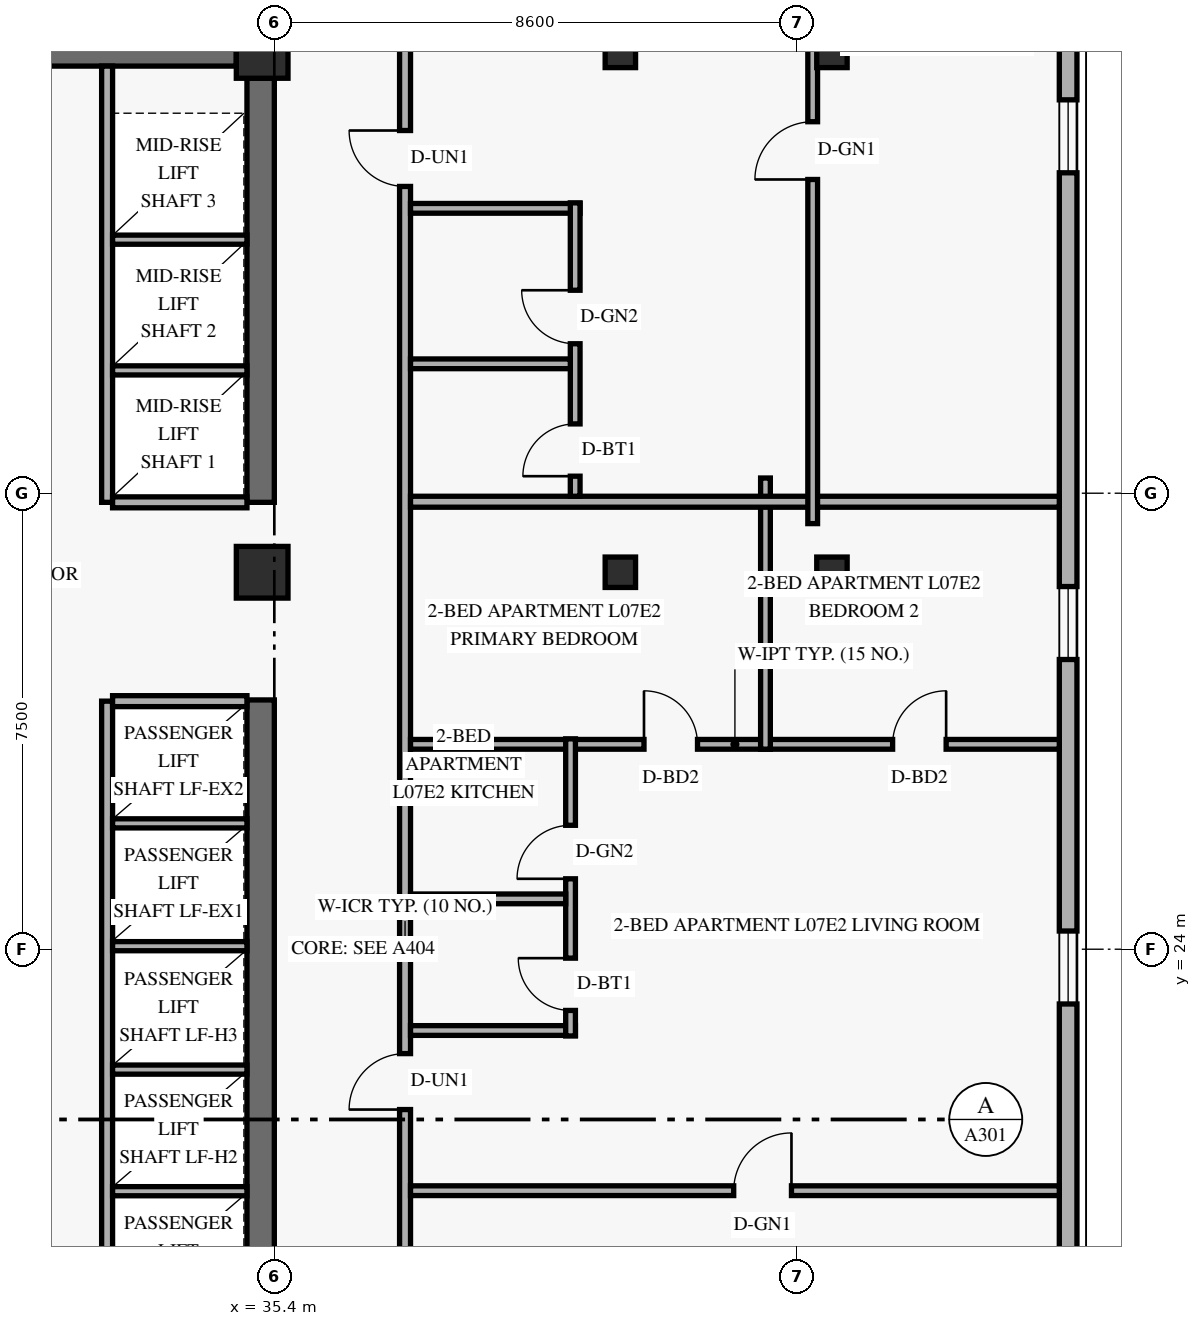
"""IFC4 building model, lengths in metres.
Left out: names, types, materials, properties, quantities, classifications, styles, units other than length and angle.
Written with IfcOpenShell. Run it as: python <this file> out.ifc"""

import sys

from ifc_helpers import new_model, si_unit, direction, frame, frame_2d, origin, origin_2d, place, context, subcontext, project, spatial, rectangle, hollow_rectangle, extrude, element, fill, save


model = new_model("IFC4")
c1 = context("Model", 3, precision=1e-05, world=origin(), true_north=direction((0.0, 1.0)))
c2 = subcontext(c1, "Body", "Model", "MODEL_VIEW")
j1 = project(units=[si_unit("LENGTHUNIT", "METRE"), si_unit("PLANEANGLEUNIT", "RADIAN")], contexts=[c1])
p1 = place(None, origin())
s1 = spatial("IfcSite", under=j1, at=p1, CompositionType="ELEMENT")
p2 = place(p1, origin())
s2 = spatial("IfcBuilding", under=s1, at=p2, CompositionType="ELEMENT")
p3 = place(p2, frame((0.0, 0.0, 31.2)))
s3 = spatial("IfcBuildingStorey", under=s2, at=p3, CompositionType="ELEMENT", Elevation=31.2)
p4 = place(p3, frame((35.175, 17.975, 0.0), z_axis=(0.0, 0.0, 1.0), x_axis=(0.0, 1.0, 0.0)))
e1 = element("IfcWall", 1, at=p4, inside=s3, PredefinedType="SHEAR", context=c2, shape_type="SweptSolid", body=[
    extrude(rectangle(XDim=10.125, YDim=0.45, at=frame_2d((5.062, 0.0))), origin(), (0.0, 0.0, 1.0), 2.667),
])
p5 = place(p3, frame((35.175, 31.35, 0.0), z_axis=(0.0, 0.0, 1.0), x_axis=(0.0, 1.0, 0.0)))
e2 = element("IfcWall", 2, at=p5, inside=s3, PredefinedType="SHEAR", context=c2, shape_type="SweptSolid", body=[
    extrude(rectangle(XDim=6.975, YDim=0.45, at=frame_2d((3.487, 0.0))), origin(), (0.0, 0.0, 1.0), 2.667),
])
p6 = place(p3, frame((24.625, 38.75, 0.0), z_axis=(0.0, 0.0, 1.0), x_axis=(1.0, 0.0, 0.0)))
e3 = element("IfcWall", 3, at=p6, inside=s3, PredefinedType="SHEAR", context=c2, shape_type="SweptSolid", body=[
    extrude(rectangle(XDim=10.15, YDim=0.45, at=frame_2d((5.075, 0.0))), origin(), (0.0, 0.0, 1.0), 3.36),
])
for number, where, z_axis, x_axis in (
    (4, (35.2, 30.2, 0.0), (0.0, 0.0, 1.0), (1.0, 0.0, 0.0)),
    (5, (35.2, 38.75, 0.0), (0.0, 0.0, 1.0), (1.0, 0.0, 0.0)),
):
    element("IfcColumn", number, at=place(p3, frame(where, z_axis=z_axis, x_axis=x_axis)), inside=s3, PredefinedType="COLUMN", context=c2, shape_type="SweptSolid", body=[
        extrude(rectangle(XDim=0.85, YDim=0.85, at=origin_2d()), origin(), (0.0, 0.0, 1.0), 3.6),
    ])
for number, where, z_axis, x_axis in (
    (6, (41.028, 30.2, 0.0), (0.035, 0.0, 0.999), (0.0, 1.0, 0.0)),
    (7, (41.028, 38.75, 0.0), (0.035, 0.0, 0.999), (0.0, 1.0, 0.0)),
):
    element("IfcColumn", number, at=place(p3, frame(where, z_axis=z_axis, x_axis=x_axis)), inside=s3, PredefinedType="COLUMN", context=c2, shape_type="SweptSolid", body=[
        extrude(hollow_rectangle(XDim=0.5, YDim=0.5, WallThickness=0.022, at=origin_2d()), origin(), (0.0, 0.0, 1.0), 3.602),
    ])
for number, where, z_axis, x_axis in (
    (8, (44.466, 30.2, 0.0), (0.058, 0.0, 0.998), (0.0, 1.0, 0.0)),
    (9, (44.466, 38.75, 0.0), (0.058, 0.0, 0.998), (0.0, 1.0, 0.0)),
):
    element("IfcColumn", number, at=place(p3, frame(where, z_axis=z_axis, x_axis=x_axis)), inside=s3, PredefinedType="COLUMN", context=c2, shape_type="SweptSolid", body=[
        extrude(hollow_rectangle(XDim=0.5, YDim=0.5, WallThickness=0.022, at=origin_2d()), origin(), (0.0, 0.0, 1.0), 3.606),
    ])
p7 = place(p3, frame((48.455, 4.62, 0.0), z_axis=(0.0, 0.0, 1.0), x_axis=(0.0, 1.0, 0.0)))
e10 = element("IfcWall", 10, at=p7, inside=s3, PredefinedType="SOLIDWALL", context=c2, shape_type="SweptSolid", body=[
    extrude(rectangle(XDim=38.76, YDim=0.29, at=frame_2d((19.38, 0.0))), origin(), (0.0, 0.0, 1.0), 3.36),
])
p8 = place(p7, frame((4.95, 0.0, 0.85)))
e11 = element("IfcOpeningElement", 11, at=p8, cuts=e10, PredefinedType="OPENING", context=c2, shape_type="SweptSolid", body=[
    extrude(rectangle(XDim=1.2, YDim=1.5, at=frame_2d((0.6, 0.75))), frame((0.0, 0.155, 0.0), z_axis=(0.0, -1.0, 0.0), x_axis=(1.0, 0.0, 0.0)), (0.0, 0.0, 1.0), 0.31),
])
p9 = place(p7, frame((12.654, 0.0, 0.85)))
e12 = element("IfcOpeningElement", 12, at=p9, cuts=e10, PredefinedType="OPENING", context=c2, shape_type="SweptSolid", body=[
    extrude(rectangle(XDim=1.2, YDim=1.5, at=frame_2d((0.6, 0.75))), frame((0.0, 0.155, 0.0), z_axis=(0.0, -1.0, 0.0), x_axis=(1.0, 0.0, 0.0)), (0.0, 0.0, 1.0), 0.31),
])
p10 = place(p7, frame((18.479, 0.0, 0.85)))
e13 = element("IfcOpeningElement", 13, at=p10, cuts=e10, PredefinedType="OPENING", context=c2, shape_type="SweptSolid", body=[
    extrude(rectangle(XDim=1.2, YDim=1.5, at=frame_2d((0.6, 0.75))), frame((0.0, 0.155, 0.0), z_axis=(0.0, -1.0, 0.0), x_axis=(1.0, 0.0, 0.0)), (0.0, 0.0, 1.0), 0.31),
])
p11 = place(p7, frame((24.145, 0.0, 0.85)))
e14 = element("IfcOpeningElement", 14, at=p11, cuts=e10, PredefinedType="OPENING", context=c2, shape_type="SweptSolid", body=[
    extrude(rectangle(XDim=1.2, YDim=1.5, at=frame_2d((0.6, 0.75))), frame((0.0, 0.155, 0.0), z_axis=(0.0, -1.0, 0.0), x_axis=(1.0, 0.0, 0.0)), (0.0, 0.0, 1.0), 0.31),
])
p12 = place(p7, frame((32.15, 0.0, 0.85)))
e15 = element("IfcOpeningElement", 15, at=p12, cuts=e10, PredefinedType="OPENING", context=c2, shape_type="SweptSolid", body=[
    extrude(rectangle(XDim=1.2, YDim=1.5, at=frame_2d((0.6, 0.75))), frame((0.0, 0.155, 0.0), z_axis=(0.0, -1.0, 0.0), x_axis=(1.0, 0.0, 0.0)), (0.0, 0.0, 1.0), 0.31),
])
p13 = place(p3, frame((32.65, 18.02, 0.0), z_axis=(0.0, 0.0, 1.0), x_axis=(0.0, 1.0, 0.0)))
e16 = element("IfcWall", 16, at=p13, inside=s3, PredefinedType="STANDARD", context=c2, shape_type="SweptSolid", body=[
    extrude(rectangle(XDim=10.06, YDim=0.18, at=frame_2d((5.03, 0.0))), origin(), (0.0, 0.0, 1.0), 3.36),
])
p14 = place(p3, frame((32.74, 28.08, 0.0), z_axis=(0.0, 0.0, 1.0), x_axis=(1.0, 0.0, 0.0)))
e17 = element("IfcWall", 17, at=p14, inside=s3, PredefinedType="STANDARD", context=c2, shape_type="SweptSolid", body=[
    extrude(rectangle(XDim=2.21, YDim=0.18, at=frame_2d((1.105, 0.0))), origin(), (0.0, 0.0, 1.0), 3.36),
])
for number, where, z_axis, x_axis in (
    (18, (32.74, 20.02, 0.0), (0.0, 0.0, 1.0), (1.0, 0.0, 0.0)),
    (19, (32.74, 22.02, 0.0), (0.0, 0.0, 1.0), (1.0, 0.0, 0.0)),
    (20, (32.74, 24.05, 0.0), (0.0, 0.0, 1.0), (1.0, 0.0, 0.0)),
    (21, (32.74, 26.07, 0.0), (0.0, 0.0, 1.0), (1.0, 0.0, 0.0)),
):
    element("IfcWall", number, at=place(p3, frame(where, z_axis=z_axis, x_axis=x_axis)), inside=s3, PredefinedType="STANDARD", context=c2, shape_type="SweptSolid", body=[
        extrude(rectangle(XDim=2.21, YDim=0.15, at=frame_2d((1.105, 0.0))), origin(), (0.0, 0.0, 1.0), 3.36),
    ])
p15 = place(p3, frame((32.65, 31.35, 0.0), z_axis=(0.0, 0.0, 1.0), x_axis=(0.0, 1.0, 0.0)))
e22 = element("IfcWall", 22, at=p15, inside=s3, PredefinedType="STANDARD", context=c2, shape_type="SweptSolid", body=[
    extrude(rectangle(XDim=7.175, YDim=0.18, at=frame_2d((3.587, 0.0))), origin(), (0.0, 0.0, 1.0), 3.36),
])
p16 = place(p3, frame((32.74, 31.35, 0.0), z_axis=(0.0, 0.0, 1.0), x_axis=(1.0, 0.0, 0.0)))
e23 = element("IfcWall", 23, at=p16, inside=s3, PredefinedType="STANDARD", context=c2, shape_type="SweptSolid", body=[
    extrude(rectangle(XDim=2.21, YDim=0.18, at=frame_2d((1.105, 0.0))), origin(), (0.0, 0.0, 1.0), 3.36),
])
for number, where, z_axis, x_axis in (
    (24, (32.74, 33.52, 0.0), (0.0, 0.0, 1.0), (1.0, 0.0, 0.0)),
    (25, (32.74, 35.67, 0.0), (0.0, 0.0, 1.0), (1.0, 0.0, 0.0)),
):
    element("IfcWall", number, at=place(p3, frame(where, z_axis=z_axis, x_axis=x_axis)), inside=s3, PredefinedType="STANDARD", context=c2, shape_type="SweptSolid", body=[
        extrude(rectangle(XDim=2.21, YDim=0.15, at=frame_2d((1.105, 0.0))), origin(), (0.0, 0.0, 1.0), 3.36),
    ])
p17 = place(p3, frame((37.55, 1.29, 0.0), z_axis=(0.0, 0.0, 1.0), x_axis=(0.0, 1.0, 0.0)))
e26 = element("IfcWall", 26, at=p17, inside=s3, PredefinedType="STANDARD", context=c2, shape_type="SweptSolid", body=[
    extrude(rectangle(XDim=45.42, YDim=0.18, at=frame_2d((22.71, 0.0))), origin(), (0.0, 0.0, 1.0), 2.649),
])
p18 = place(p17, frame((8.49, 0.0, 0.0)))
e27 = element("IfcOpeningElement", 27, at=p18, cuts=e26, PredefinedType="OPENING", context=c2, shape_type="SweptSolid", body=[
    extrude(rectangle(XDim=0.92, YDim=2.15, at=frame_2d((0.46, 1.075))), frame((0.0, 0.1, 0.0), z_axis=(0.0, -1.0, 0.0), x_axis=(1.0, 0.0, 0.0)), (0.0, 0.0, 1.0), 0.2),
])
p19 = place(p17, frame((20.073, 0.0, 0.0)))
e28 = element("IfcOpeningElement", 28, at=p19, cuts=e26, PredefinedType="OPENING", context=c2, shape_type="SweptSolid", body=[
    extrude(rectangle(XDim=0.92, YDim=2.15, at=frame_2d((0.46, 1.075))), frame((0.0, 0.1, 0.0), z_axis=(0.0, -1.0, 0.0), x_axis=(1.0, 0.0, 0.0)), (0.0, 0.0, 1.0), 0.2),
])
p20 = place(p17, frame((35.256, 0.0, 0.0)))
e29 = element("IfcOpeningElement", 29, at=p20, cuts=e26, PredefinedType="OPENING", context=c2, shape_type="SweptSolid", body=[
    extrude(rectangle(XDim=0.92, YDim=2.15, at=frame_2d((0.46, 1.075))), frame((0.0, 0.1, 0.0), z_axis=(0.0, -1.0, 0.0), x_axis=(1.0, 0.0, 0.0)), (0.0, 0.0, 1.0), 0.2),
])
p21 = place(p3, frame((35.42, 38.75, 0.0), z_axis=(0.0, 0.0, 1.0), x_axis=(0.0, 1.0, 0.0)))
e30 = element("IfcWall", 30, at=p21, inside=s3, PredefinedType="STANDARD", context=c2, shape_type="SweptSolid", body=[
    extrude(rectangle(XDim=0.51, YDim=0.18, at=frame_2d((0.255, 0.0))), origin(), (0.0, 0.0, 1.0), 3.36),
])
p22 = place(p3, frame((37.64, 27.37, 0.0), z_axis=(0.0, 0.0, 1.0), x_axis=(1.0, 0.0, 0.0)))
e31 = element("IfcWall", 31, at=p22, inside=s3, PredefinedType="PARTITIONING", context=c2, shape_type="SweptSolid", body=[
    extrude(rectangle(XDim=10.67, YDim=0.16, at=frame_2d((5.335, 0.0))), origin(), (0.0, 0.0, 1.0), 2.649),
])
p23 = place(p22, frame((3.84, 0.0, 0.0)))
e32 = element("IfcOpeningElement", 32, at=p23, cuts=e31, PredefinedType="OPENING", context=c2, shape_type="SweptSolid", body=[
    extrude(rectangle(XDim=0.88, YDim=2.14, at=frame_2d((0.44, 1.07))), frame((0.0, 0.09, 0.0), z_axis=(0.0, -1.0, 0.0), x_axis=(1.0, 0.0, 0.0)), (0.0, 0.0, 1.0), 0.18),
])
p24 = place(p22, frame((7.929, 0.0, 0.0)))
e33 = element("IfcOpeningElement", 33, at=p24, cuts=e31, PredefinedType="OPENING", context=c2, shape_type="SweptSolid", body=[
    extrude(rectangle(XDim=0.88, YDim=2.14, at=frame_2d((0.44, 1.07))), frame((0.0, 0.09, 0.0), z_axis=(0.0, -1.0, 0.0), x_axis=(1.0, 0.0, 0.0)), (0.0, 0.0, 1.0), 0.18),
])
p25 = place(p3, frame((37.64, 22.663, 0.0), z_axis=(0.0, 0.0, 1.0), x_axis=(1.0, 0.0, 0.0)))
e34 = element("IfcWall", 34, at=p25, inside=s3, PredefinedType="PLUMBINGWALL", context=c2, shape_type="SweptSolid", body=[
    extrude(rectangle(XDim=2.712, YDim=0.16, at=frame_2d((1.356, 0.0))), origin(), (0.0, 0.0, 1.0), 3.36),
])
p26 = place(p3, frame((40.272, 22.573, 0.0), z_axis=(0.0, 0.0, 1.0), x_axis=(0.0, 1.0, 0.0)))
e35 = element("IfcWall", 35, at=p26, inside=s3, PredefinedType="PLUMBINGWALL", context=c2, shape_type="SweptSolid", body=[
    extrude(rectangle(XDim=4.887, YDim=0.16, at=frame_2d((2.443, 0.0))), origin(), (0.0, 0.0, 1.0), 3.36),
])
p27 = place(p26, frame((0.42, 0.0, 0.0)))
e36 = element("IfcOpeningElement", 36, at=p27, cuts=e35, PredefinedType="OPENING", context=c2, shape_type="SweptSolid", body=[
    extrude(rectangle(XDim=0.86, YDim=2.12, at=frame_2d((0.43, 1.06))), frame((0.0, 0.09, 0.0), z_axis=(0.0, -1.0, 0.0), x_axis=(1.0, 0.0, 0.0)), (0.0, 0.0, 1.0), 0.18),
])
p28 = place(p26, frame((2.585, 0.0, 0.0)))
e37 = element("IfcOpeningElement", 37, at=p28, cuts=e35, PredefinedType="OPENING", context=c2, shape_type="SweptSolid", body=[
    extrude(rectangle(XDim=0.88, YDim=2.12, at=frame_2d((0.44, 1.06))), frame((0.0, 0.09, 0.0), z_axis=(0.0, -1.0, 0.0), x_axis=(1.0, 0.0, 0.0)), (0.0, 0.0, 1.0), 0.18),
])
p29 = place(p3, frame((37.64, 24.828, 0.0), z_axis=(0.0, 0.0, 1.0), x_axis=(1.0, 0.0, 0.0)))
e38 = element("IfcWall", 38, at=p29, inside=s3, PredefinedType="PLUMBINGWALL", context=c2, shape_type="SweptSolid", body=[
    extrude(rectangle(XDim=2.552, YDim=0.16, at=frame_2d((1.276, 0.0))), origin(), (0.0, 0.0, 1.0), 3.36),
])
p30 = place(p3, frame((37.64, 20.029, 0.0), z_axis=(0.0, 0.0, 1.0), x_axis=(1.0, 0.0, 0.0)))
e39 = element("IfcWall", 39, at=p30, inside=s3, PredefinedType="PARTITIONING", context=c2, shape_type="SweptSolid", body=[
    extrude(rectangle(XDim=10.67, YDim=0.16, at=frame_2d((5.335, 0.0))), origin(), (0.0, 0.0, 1.0), 2.649),
])
p31 = place(p30, frame((5.315, 0.0, 0.0)))
e40 = element("IfcOpeningElement", 40, at=p31, cuts=e39, PredefinedType="OPENING", context=c2, shape_type="SweptSolid", body=[
    extrude(rectangle(XDim=0.95, YDim=2.15, at=frame_2d((0.475, 1.075))), frame((0.0, 0.09, 0.0), z_axis=(0.0, -1.0, 0.0), x_axis=(1.0, 0.0, 0.0)), (0.0, 0.0, 1.0), 0.18),
])
p32 = place(p3, frame((43.477, 27.29, 0.0), z_axis=(0.0, 0.0, 1.0), x_axis=(0.0, 1.0, 0.0)))
e41 = element("IfcWall", 41, at=p32, inside=s3, PredefinedType="PARTITIONING", context=c2, shape_type="SweptSolid", body=[
    extrude(rectangle(XDim=4.46, YDim=0.16, at=frame_2d((2.23, 0.0))), origin(), (0.0, 0.0, 1.0), 2.649),
])
p33 = place(p3, frame((37.64, 31.36, 0.0), z_axis=(0.0, 0.0, 1.0), x_axis=(1.0, 0.0, 0.0)))
e42 = element("IfcWall", 42, at=p33, inside=s3, PredefinedType="PARTITIONING", context=c2, shape_type="SweptSolid", body=[
    extrude(rectangle(XDim=10.67, YDim=0.18, at=frame_2d((5.335, 0.0))), origin(), (0.0, 0.0, 1.0), 2.649),
])
p34 = place(p3, frame((37.64, 36.186, 0.0), z_axis=(0.0, 0.0, 1.0), x_axis=(1.0, 0.0, 0.0)))
e43 = element("IfcWall", 43, at=p34, inside=s3, PredefinedType="PLUMBINGWALL", context=c2, shape_type="SweptSolid", body=[
    extrude(rectangle(XDim=2.788, YDim=0.16, at=frame_2d((1.394, 0.0))), origin(), (0.0, 0.0, 1.0), 3.36),
])
p35 = place(p3, frame((40.348, 31.45, 0.0), z_axis=(0.0, 0.0, 1.0), x_axis=(0.0, 1.0, 0.0)))
e44 = element("IfcWall", 44, at=p35, inside=s3, PredefinedType="PLUMBINGWALL", context=c2, shape_type="SweptSolid", body=[
    extrude(rectangle(XDim=4.825, YDim=0.16, at=frame_2d((2.413, 0.0))), origin(), (0.0, 0.0, 1.0), 2.932),
])
p36 = place(p35, frame((0.33, 0.0, 0.0)))
e45 = element("IfcOpeningElement", 45, at=p36, cuts=e44, PredefinedType="OPENING", context=c2, shape_type="SweptSolid", body=[
    extrude(rectangle(XDim=0.86, YDim=2.12, at=frame_2d((0.43, 1.06))), frame((0.0, 0.09, 0.0), z_axis=(0.0, -1.0, 0.0), x_axis=(1.0, 0.0, 0.0)), (0.0, 0.0, 1.0), 0.18),
])
p37 = place(p35, frame((2.508, 0.0, 0.0)))
e46 = element("IfcOpeningElement", 46, at=p37, cuts=e44, PredefinedType="OPENING", context=c2, shape_type="SweptSolid", body=[
    extrude(rectangle(XDim=0.88, YDim=2.12, at=frame_2d((0.44, 1.06))), frame((0.0, 0.09, 0.0), z_axis=(0.0, -1.0, 0.0), x_axis=(1.0, 0.0, 0.0)), (0.0, 0.0, 1.0), 0.18),
])
p38 = place(p3, frame((37.64, 33.628, 0.0), z_axis=(0.0, 0.0, 1.0), x_axis=(1.0, 0.0, 0.0)))
e47 = element("IfcWall", 47, at=p38, inside=s3, PredefinedType="PLUMBINGWALL", context=c2, shape_type="SweptSolid", body=[
    extrude(rectangle(XDim=2.628, YDim=0.16, at=frame_2d((1.314, 0.0))), origin(), (0.0, 0.0, 1.0), 3.36),
])
p39 = place(p3, frame((44.254, 31.0, 0.0), z_axis=(0.0, 0.0, 1.0), x_axis=(0.0, 1.0, 0.0)))
e48 = element("IfcWall", 48, at=p39, inside=s3, PredefinedType="PARTITIONING", context=c2, shape_type="SweptSolid", body=[
    extrude(rectangle(XDim=12.84, YDim=0.16, at=frame_2d((6.42, 0.0))), origin(), (0.0, 0.0, 1.0), 2.649),
])
p40 = place(p39, frame((5.66, 0.0, 0.0)))
e49 = element("IfcOpeningElement", 49, at=p40, cuts=e48, PredefinedType="OPENING", context=c2, shape_type="SweptSolid", body=[
    extrude(rectangle(XDim=0.95, YDim=2.15, at=frame_2d((0.475, 1.075))), frame((0.0, 0.09, 0.0), z_axis=(0.0, -1.0, 0.0), x_axis=(1.0, 0.0, 0.0)), (0.0, 0.0, 1.0), 0.18),
])
p41 = place(p10, origin())
e50 = element("IfcWindow", 50, at=p41, inside=s3, PartitioningType="SINGLE_PANEL", PredefinedType="WINDOW", context=c2, shape_type="SweptSolid", body=[
    extrude(rectangle(XDim=1.2, YDim=1.5, at=frame_2d((0.6, 0.75))), frame((0.0, 0.03, 0.0), z_axis=(0.0, -1.0, 0.0), x_axis=(1.0, 0.0, 0.0)), (0.0, 0.0, 1.0), 0.06),
])
fill(e13, e50)
p42 = place(p11, origin())
e51 = element("IfcWindow", 51, at=p42, inside=s3, PartitioningType="SINGLE_PANEL", PredefinedType="WINDOW", context=c2, shape_type="SweptSolid", body=[
    extrude(rectangle(XDim=1.2, YDim=1.5, at=frame_2d((0.6, 0.75))), frame((0.0, 0.03, 0.0), z_axis=(0.0, -1.0, 0.0), x_axis=(1.0, 0.0, 0.0)), (0.0, 0.0, 1.0), 0.06),
])
fill(e14, e51)
p43 = place(p12, origin())
e52 = element("IfcWindow", 52, at=p43, inside=s3, PartitioningType="SINGLE_PANEL", PredefinedType="WINDOW", context=c2, shape_type="SweptSolid", body=[
    extrude(rectangle(XDim=1.2, YDim=1.5, at=frame_2d((0.6, 0.75))), frame((0.0, 0.03, 0.0), z_axis=(0.0, -1.0, 0.0), x_axis=(1.0, 0.0, 0.0)), (0.0, 0.0, 1.0), 0.06),
])
fill(e15, e52)
p44 = place(p31, origin())
e53 = element("IfcDoor", 53, at=p44, inside=s3, OperationType="SINGLE_SWING_RIGHT", PredefinedType="DOOR", context=c2, shape_type="SweptSolid", body=[
    extrude(rectangle(XDim=0.95, YDim=2.15, at=frame_2d((0.475, 1.075))), frame((0.0, 0.025, 0.0), z_axis=(0.0, -1.0, 0.0), x_axis=(1.0, 0.0, 0.0)), (0.0, 0.0, 1.0), 0.05),
])
fill(e40, e53)
p45 = place(p19, origin())
e54 = element("IfcDoor", 54, at=p45, inside=s3, OperationType="SINGLE_SWING_LEFT", PredefinedType="DOOR", context=c2, shape_type="SweptSolid", body=[
    extrude(rectangle(XDim=0.92, YDim=2.15, at=frame_2d((0.46, 1.075))), frame((0.0, 0.025, 0.0), z_axis=(0.0, -1.0, 0.0), x_axis=(1.0, 0.0, 0.0)), (0.0, 0.0, 1.0), 0.05),
])
fill(e28, e54)
p46 = place(p27, origin())
e55 = element("IfcDoor", 55, at=p46, inside=s3, OperationType="SINGLE_SWING_RIGHT", PredefinedType="DOOR", context=c2, shape_type="SweptSolid", body=[
    extrude(rectangle(XDim=0.86, YDim=2.12, at=frame_2d((0.43, 1.06))), frame((0.0, 0.025, 0.0), z_axis=(0.0, -1.0, 0.0), x_axis=(1.0, 0.0, 0.0)), (0.0, 0.0, 1.0), 0.05),
])
fill(e36, e55)
p47 = place(p28, origin())
e56 = element("IfcDoor", 56, at=p47, inside=s3, OperationType="SINGLE_SWING_LEFT", PredefinedType="DOOR", context=c2, shape_type="SweptSolid", body=[
    extrude(rectangle(XDim=0.88, YDim=2.12, at=frame_2d((0.44, 1.06))), frame((0.0, 0.025, 0.0), z_axis=(0.0, -1.0, 0.0), x_axis=(1.0, 0.0, 0.0)), (0.0, 0.0, 1.0), 0.05),
])
fill(e37, e56)
p48 = place(p23, origin())
e57 = element("IfcDoor", 57, at=p48, inside=s3, OperationType="SINGLE_SWING_LEFT", PredefinedType="DOOR", context=c2, shape_type="SweptSolid", body=[
    extrude(rectangle(XDim=0.88, YDim=2.14, at=frame_2d((0.44, 1.07))), frame((0.0, 0.025, 0.0), z_axis=(0.0, -1.0, 0.0), x_axis=(1.0, 0.0, 0.0)), (0.0, 0.0, 1.0), 0.05),
])
fill(e32, e57)
p49 = place(p24, origin())
e58 = element("IfcDoor", 58, at=p49, inside=s3, OperationType="SINGLE_SWING_RIGHT", PredefinedType="DOOR", context=c2, shape_type="SweptSolid", body=[
    extrude(rectangle(XDim=0.88, YDim=2.14, at=frame_2d((0.44, 1.07))), frame((0.0, 0.025, 0.0), z_axis=(0.0, -1.0, 0.0), x_axis=(1.0, 0.0, 0.0)), (0.0, 0.0, 1.0), 0.05),
])
fill(e33, e58)
p50 = place(p40, origin())
e59 = element("IfcDoor", 59, at=p50, inside=s3, OperationType="SINGLE_SWING_LEFT", PredefinedType="DOOR", context=c2, shape_type="SweptSolid", body=[
    extrude(rectangle(XDim=0.95, YDim=2.15, at=frame_2d((0.475, 1.075))), frame((0.0, 0.025, 0.0), z_axis=(0.0, -1.0, 0.0), x_axis=(1.0, 0.0, 0.0)), (0.0, 0.0, 1.0), 0.05),
])
fill(e49, e59)
p51 = place(p20, origin())
e60 = element("IfcDoor", 60, at=p51, inside=s3, OperationType="SINGLE_SWING_RIGHT", PredefinedType="DOOR", context=c2, shape_type="SweptSolid", body=[
    extrude(rectangle(XDim=0.92, YDim=2.15, at=frame_2d((0.46, 1.075))), frame((0.0, 0.025, 0.0), z_axis=(0.0, -1.0, 0.0), x_axis=(1.0, 0.0, 0.0)), (0.0, 0.0, 1.0), 0.05),
])
fill(e29, e60)
p52 = place(p36, origin())
e61 = element("IfcDoor", 61, at=p52, inside=s3, OperationType="SINGLE_SWING_LEFT", PredefinedType="DOOR", context=c2, shape_type="SweptSolid", body=[
    extrude(rectangle(XDim=0.86, YDim=2.12, at=frame_2d((0.43, 1.06))), frame((0.0, 0.025, 0.0), z_axis=(0.0, -1.0, 0.0), x_axis=(1.0, 0.0, 0.0)), (0.0, 0.0, 1.0), 0.05),
])
fill(e45, e61)
p53 = place(p37, origin())
e62 = element("IfcDoor", 62, at=p53, inside=s3, OperationType="SINGLE_SWING_RIGHT", PredefinedType="DOOR", context=c2, shape_type="SweptSolid", body=[
    extrude(rectangle(XDim=0.88, YDim=2.12, at=frame_2d((0.44, 1.06))), frame((0.0, 0.025, 0.0), z_axis=(0.0, -1.0, 0.0), x_axis=(1.0, 0.0, 0.0)), (0.0, 0.0, 1.0), 0.05),
])
fill(e46, e62)
save(model, sys.argv[1])
